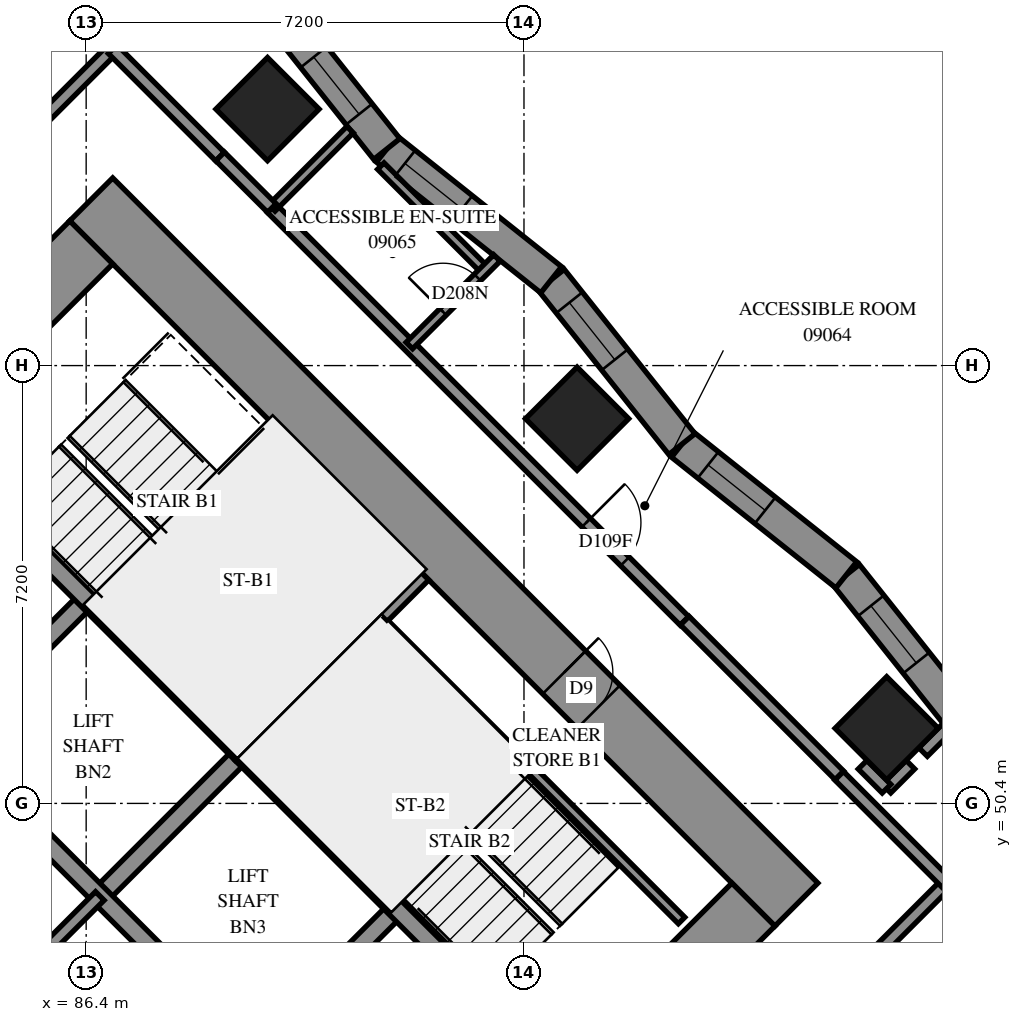
"""IFC4 building model, lengths in metres.
Left out: names, types, materials, properties, quantities, classifications, styles, units other than length and angle.
Written with IfcOpenShell. Run it as: python <this file> out.ifc"""

import sys

from ifc_helpers import new_model, si_unit, direction, frame, frame_2d, origin, origin_2d, place, context, subcontext, project, spatial, polyline, rectangle, outline, extrude, element, fill, save


model = new_model("IFC4")
c1 = context("Model", 3, precision=1e-05, world=origin(), true_north=direction((0.0, 1.0)))
c2 = subcontext(c1, "Body", "Model", "MODEL_VIEW")
j1 = project(units=[si_unit("LENGTHUNIT", "METRE"), si_unit("PLANEANGLEUNIT", "RADIAN")], contexts=[c1])
p1 = place(None, origin())
s1 = spatial("IfcSite", under=j1, at=p1, CompositionType="ELEMENT")
p2 = place(p1, origin())
s2 = spatial("IfcBuilding", under=s1, at=p2, CompositionType="ELEMENT")
p3 = place(p2, frame((0.0, 0.0, 37.2)))
s3 = spatial("IfcBuildingStorey", under=s2, at=p3, CompositionType="ELEMENT", Elevation=37.2)
for number, where, z_axis, x_axis in (
    (1, (89.382, 61.818, 0.0), (0.0, 0.0, 1.0), (0.707, -0.707, 0.0)),
    (2, (94.474, 56.727, 0.0), (0.0, 0.0, 1.0), (0.707, -0.707, 0.0)),
    (3, (99.565, 51.635, 0.0), (0.0, 0.0, 1.0), (0.707, -0.707, 0.0)),
):
    element("IfcColumn", number, at=place(p3, frame(where, z_axis=z_axis, x_axis=x_axis)), inside=s3, PredefinedType="COLUMN", context=c2, shape_type="SweptSolid", body=[
        extrude(rectangle(XDim=1.2, YDim=1.2, at=origin_2d()), origin(), (0.0, 0.0, 1.0), 3.1),
    ])
p4 = place(p3, frame((75.594, 49.443, -0.3), z_axis=(0.0, 0.0, 1.0), x_axis=(0.7071037324, -0.70710983, 0.0)))
e4 = element("IfcWall", 4, at=p4, inside=s3, PredefinedType="SHEAR", context=c2, shape_type="SweptSolid", body=[
    extrude(rectangle(XDim=16.4, YDim=1.0, at=frame_2d((8.2, 0.0))), origin(), (0.0, 0.0, 1.0), 2.7),
])
p5 = place(p3, frame((86.483, 60.333, -0.3), z_axis=(0.0, 0.0, 1.0), x_axis=(0.70710983, -0.7071037324, 0.0)))
e5 = element("IfcWall", 5, at=p5, inside=s3, PredefinedType="SHEAR", context=c2, shape_type="SweptSolid", body=[
    extrude(rectangle(XDim=16.4, YDim=1.0, at=frame_2d((8.2, 0.0))), origin(), (0.0, 0.0, 1.0), 2.7),
])
p6 = place(p5, frame((11.0, 0.0, 0.3)))
e6 = element("IfcOpeningElement", 6, at=p6, cuts=e5, PredefinedType="OPENING", context=c2, shape_type="SweptSolid", body=[
    extrude(rectangle(XDim=0.8, YDim=2.1, at=frame_2d((0.4, 1.05))), frame((0.0, 0.51, 0.0), z_axis=(0.0, -1.0, 0.0), x_axis=(1.0, 0.0, 0.0)), (0.0, 0.0, 1.0), 1.02),
])
p7 = place(p3, frame((76.301, 49.443, -0.3), z_axis=(0.0, 0.0, 1.0), x_axis=(0.7071067812, 0.7071067812, 0.0)))
e7 = element("IfcWall", 7, at=p7, inside=s3, PredefinedType="SHEAR", context=c2, shape_type="SweptSolid", body=[
    extrude(rectangle(XDim=14.4, YDim=1.0, at=frame_2d((7.2, 0.0))), origin(), (0.0, 0.0, 1.0), 2.7),
])
p8 = place(p7, frame((4.55, 0.0, 0.3)))
e8 = element("IfcOpeningElement", 8, at=p8, cuts=e7, PredefinedType="OPENING", context=c2, shape_type="SweptSolid", body=[
    extrude(rectangle(XDim=1.1, YDim=2.1, at=frame_2d((0.55, 1.05))), frame((0.0, 0.51, 0.0), z_axis=(0.0, -1.0, 0.0), x_axis=(1.0, 0.0, 0.0)), (0.0, 0.0, 1.0), 1.02),
])
p9 = place(p7, frame((11.35, 0.0, 0.3)))
e9 = element("IfcOpeningElement", 9, at=p9, cuts=e7, PredefinedType="OPENING", context=c2, shape_type="SweptSolid", body=[
    extrude(rectangle(XDim=1.1, YDim=2.1, at=frame_2d((0.55, 1.05))), frame((0.0, 0.51, 0.0), z_axis=(0.0, -1.0, 0.0), x_axis=(1.0, 0.0, 0.0)), (0.0, 0.0, 1.0), 1.02),
])
p10 = place(p3, frame((87.19, 38.554, -0.3), z_axis=(0.0, 0.0, 1.0), x_axis=(0.707103309, 0.7071102534, 0.0)))
e10 = element("IfcWall", 10, at=p10, inside=s3, PredefinedType="SHEAR", context=c2, shape_type="SweptSolid", body=[
    extrude(rectangle(XDim=14.4, YDim=1.0, at=frame_2d((7.2, 0.0))), origin(), (0.0, 0.0, 1.0), 2.7),
])
p11 = place(p10, frame((4.55, 0.0, 0.3)))
e11 = element("IfcOpeningElement", 11, at=p11, cuts=e10, PredefinedType="OPENING", context=c2, shape_type="SweptSolid", body=[
    extrude(rectangle(XDim=1.1, YDim=2.1, at=frame_2d((0.55, 1.05))), frame((0.0, 0.51, 0.0), z_axis=(0.0, -1.0, 0.0), x_axis=(1.0, 0.0, 0.0)), (0.0, 0.0, 1.0), 1.02),
])
p12 = place(p10, frame((11.35, 0.0, 0.3)))
e12 = element("IfcOpeningElement", 12, at=p12, cuts=e10, PredefinedType="OPENING", context=c2, shape_type="SweptSolid", body=[
    extrude(rectangle(XDim=1.1, YDim=2.1, at=frame_2d((0.55, 1.05))), frame((0.0, 0.51, 0.0), z_axis=(0.0, -1.0, 0.0), x_axis=(1.0, 0.0, 0.0)), (0.0, 0.0, 1.0), 1.02),
])
p13 = place(p3, frame((84.079, 51.423, 0.0), z_axis=(0.0, 0.0, 1.0), x_axis=(0.7071219326, 0.7070916295, 0.0)))
e13 = element("IfcWall", 13, at=p13, inside=s3, PredefinedType="SOLIDWALL", context=c2, shape_type="SweptSolid", body=[
    extrude(rectangle(XDim=3.3, YDim=0.3, at=frame_2d((1.65, 0.0))), origin(), (0.0, 0.0, 1.0), 3.1),
])
for number, where, z_axis, x_axis in (
    (14, (86.625, 48.878, 0.0), (0.0, 0.0, 1.0), (0.707, 0.707, 0.0)),
    (15, (89.17, 46.332, 0.0), (0.0, 0.0, 1.0), (0.707, 0.707, 0.0)),
):
    element("IfcWall", number, at=place(p3, frame(where, z_axis=z_axis, x_axis=x_axis)), inside=s3, PredefinedType="SOLIDWALL", context=c2, shape_type="SweptSolid", body=[
        extrude(rectangle(XDim=3.3, YDim=0.3, at=frame_2d((1.65, 0.0))), origin(), (0.0, 0.0, 1.0), 3.1),
    ])
p14 = place(p3, frame((78.988, 51.423, 0.0), z_axis=(0.0, 0.0, 1.0), x_axis=(0.7071067812, -0.7071067812, 0.0)))
e16 = element("IfcWall", 16, at=p14, inside=s3, PredefinedType="SOLIDWALL", context=c2, shape_type="SweptSolid", body=[
    extrude(rectangle(XDim=14.4, YDim=0.3, at=frame_2d((7.2, 0.0))), origin(), (0.0, 0.0, 1.0), 3.1),
])
p15 = place(p14, frame((1.25, 0.0, 0.0)))
e17 = element("IfcOpeningElement", 17, at=p15, cuts=e16, PredefinedType="OPENING", context=c2, shape_type="SweptSolid", body=[
    extrude(rectangle(XDim=1.1, YDim=2.1, at=frame_2d((0.55, 1.05))), frame((0.0, 0.16, 0.0), z_axis=(0.0, -1.0, 0.0), x_axis=(1.0, 0.0, 0.0)), (0.0, 0.0, 1.0), 0.32),
])
p16 = place(p14, frame((4.85, 0.0, 0.0)))
e18 = element("IfcOpeningElement", 18, at=p16, cuts=e16, PredefinedType="OPENING", context=c2, shape_type="SweptSolid", body=[
    extrude(rectangle(XDim=1.1, YDim=2.1, at=frame_2d((0.55, 1.05))), frame((0.0, 0.16, 0.0), z_axis=(0.0, -1.0, 0.0), x_axis=(1.0, 0.0, 0.0)), (0.0, 0.0, 1.0), 0.32),
])
p17 = place(p14, frame((8.45, 0.0, 0.0)))
e19 = element("IfcOpeningElement", 19, at=p17, cuts=e16, PredefinedType="OPENING", context=c2, shape_type="SweptSolid", body=[
    extrude(rectangle(XDim=1.1, YDim=2.1, at=frame_2d((0.55, 1.05))), frame((0.0, 0.16, 0.0), z_axis=(0.0, -1.0, 0.0), x_axis=(1.0, 0.0, 0.0)), (0.0, 0.0, 1.0), 0.32),
])
p18 = place(p14, frame((12.05, 0.0, 0.0)))
e20 = element("IfcOpeningElement", 20, at=p18, cuts=e16, PredefinedType="OPENING", context=c2, shape_type="SweptSolid", body=[
    extrude(rectangle(XDim=1.1, YDim=2.1, at=frame_2d((0.55, 1.05))), frame((0.0, 0.16, 0.0), z_axis=(0.0, -1.0, 0.0), x_axis=(1.0, 0.0, 0.0)), (0.0, 0.0, 1.0), 0.32),
])
p19 = place(p3, frame((81.534, 53.969, 0.0), z_axis=(0.0, 0.0, 1.0), x_axis=(0.707103309, -0.7071102534, 0.0)))
e21 = element("IfcWall", 21, at=p19, inside=s3, PredefinedType="SOLIDWALL", context=c2, shape_type="SweptSolid", body=[
    extrude(rectangle(XDim=14.4, YDim=0.3, at=frame_2d((7.2, 0.0))), origin(), (0.0, 0.0, 1.0), 3.1),
])
p20 = place(p19, frame((12.05, 0.0, 0.0)))
e22 = element("IfcOpeningElement", 22, at=p20, cuts=e21, PredefinedType="OPENING", context=c2, shape_type="SweptSolid", body=[
    extrude(rectangle(XDim=1.1, YDim=2.1, at=frame_2d((0.55, 1.05))), frame((0.0, 0.16, 0.0), z_axis=(0.0, -1.0, 0.0), x_axis=(1.0, 0.0, 0.0)), (0.0, 0.0, 1.0), 0.32),
])
for number, where, z_axis, x_axis in (
    (23, (83.867, 56.302, 0.0), (0.0, 0.0, 1.0), (0.707, -0.707, 0.0)),
    (24, (88.958, 51.211, 0.0), (0.0, 0.0, 1.0), (0.707, -0.707, 0.0)),
):
    element("IfcWall", number, at=place(p3, frame(where, z_axis=z_axis, x_axis=x_axis)), inside=s3, PredefinedType="SOLIDWALL", context=c2, shape_type="SweptSolid", body=[
        extrude(rectangle(XDim=7.2, YDim=0.3, at=frame_2d((3.6, 0.0))), origin(), (0.0, 0.0, 1.0), 3.1),
    ])
p21 = place(p3, frame((88.958, 51.211, 0.0), z_axis=(0.0, 0.0, 1.0), x_axis=(0.7071067812, 0.7071067812, 0.0)))
e25 = element("IfcWall", 25, at=p21, inside=s3, PredefinedType="SOLIDWALL", context=c2, shape_type="SweptSolid", body=[
    extrude(rectangle(XDim=4.2, YDim=0.3, at=frame_2d((2.1, 0.0))), origin(), (0.0, 0.0, 1.0), 3.1),
])
p22 = place(p3, frame((101.05, 51.455, 0.0), z_axis=(0.0, 0.0, 1.0), x_axis=(-0.6225070424, 0.7826141976, 0.0)))
e26 = element("IfcWall", 26, at=p22, inside=s3, PredefinedType="SOLIDWALL", context=c2, shape_type="SweptSolid", body=[
    extrude(outline(polyline([(0.031, -0.275), (3.485, -0.275), (3.423, 0.275), (-0.031, 0.275), (0.031, -0.275)])), origin(), (0.0, 0.0, 1.0), 3.1),
])
p23 = place(p22, frame((1.604, 0.0, 0.5)))
e27 = element("IfcOpeningElement", 27, at=p23, cuts=e26, PredefinedType="OPENING", context=c2, shape_type="SweptSolid", body=[
    extrude(rectangle(XDim=1.2, YDim=2.45, at=frame_2d((0.6, 1.225))), frame((0.0, 0.285, 0.0), z_axis=(0.0, -1.0, 0.0), x_axis=(1.0, 0.0, 0.0)), (0.0, 0.0, 1.0), 0.57),
])
p24 = place(p3, frame((98.9, 54.158, 0.0), z_axis=(0.0, 0.0, 1.0), x_axis=(-0.7826029777, 0.6225211477, 0.0)))
e28 = element("IfcWall", 28, at=p24, inside=s3, PredefinedType="SOLIDWALL", context=c2, shape_type="SweptSolid", body=[
    extrude(outline(polyline([(-0.031, -0.275), (3.423, -0.275), (3.485, 0.275), (0.031, 0.275), (-0.031, -0.275)])), origin(), (0.0, 0.0, 1.0), 3.1),
])
p25 = place(p24, frame((1.704, 0.0, 0.5)))
e29 = element("IfcOpeningElement", 29, at=p25, cuts=e28, PredefinedType="OPENING", context=c2, shape_type="SweptSolid", body=[
    extrude(rectangle(XDim=1.2, YDim=2.45, at=frame_2d((0.6, 1.225))), frame((0.0, 0.285, 0.0), z_axis=(0.0, -1.0, 0.0), x_axis=(1.0, 0.0, 0.0)), (0.0, 0.0, 1.0), 0.57),
])
p26 = place(p3, frame((96.197, 56.308, 0.0), z_axis=(0.0, 0.0, 1.0), x_axis=(-0.6225070424, 0.7826141976, 0.0)))
e30 = element("IfcWall", 30, at=p26, inside=s3, PredefinedType="SOLIDWALL", context=c2, shape_type="SweptSolid", body=[
    extrude(outline(polyline([(0.031, -0.275), (3.485, -0.275), (3.423, 0.275), (-0.031, 0.275), (0.031, -0.275)])), origin(), (0.0, 0.0, 1.0), 3.1),
])
p27 = place(p26, frame((1.773, 0.0, 0.5)))
e31 = element("IfcOpeningElement", 31, at=p27, cuts=e30, PredefinedType="OPENING", context=c2, shape_type="SweptSolid", body=[
    extrude(rectangle(XDim=1.2, YDim=2.45, at=frame_2d((0.6, 1.225))), frame((0.0, 0.285, 0.0), z_axis=(0.0, -1.0, 0.0), x_axis=(1.0, 0.0, 0.0)), (0.0, 0.0, 1.0), 0.57),
])
p28 = place(p3, frame((94.047, 59.011, 0.0), z_axis=(0.0, 0.0, 1.0), x_axis=(-0.7826141976, 0.6225070424, 0.0)))
e32 = element("IfcWall", 32, at=p28, inside=s3, PredefinedType="SOLIDWALL", context=c2, shape_type="SweptSolid", body=[
    extrude(outline(polyline([(-0.031, -0.275), (3.423, -0.275), (3.485, 0.275), (0.031, 0.275), (-0.031, -0.275)])), origin(), (0.0, 0.0, 1.0), 3.1),
])
p29 = place(p28, frame((1.874, 0.0, 0.5)))
e33 = element("IfcOpeningElement", 33, at=p29, cuts=e32, PredefinedType="OPENING", context=c2, shape_type="SweptSolid", body=[
    extrude(rectangle(XDim=1.2, YDim=2.45, at=frame_2d((0.6, 1.225))), frame((0.0, 0.285, 0.0), z_axis=(0.0, -1.0, 0.0), x_axis=(1.0, 0.0, 0.0)), (0.0, 0.0, 1.0), 0.57),
])
p30 = place(p3, frame((91.344, 61.162, 0.0), z_axis=(0.0, 0.0, 1.0), x_axis=(-0.6225070424, 0.7826141976, 0.0)))
e34 = element("IfcWall", 34, at=p30, inside=s3, PredefinedType="SOLIDWALL", context=c2, shape_type="SweptSolid", body=[
    extrude(outline(polyline([(0.031, -0.275), (3.485, -0.275), (3.423, 0.275), (-0.031, 0.275), (0.031, -0.275)])), origin(), (0.0, 0.0, 1.0), 3.1),
])
p31 = place(p30, frame((0.732, 0.0, 0.5)))
e35 = element("IfcOpeningElement", 35, at=p31, cuts=e34, PredefinedType="OPENING", context=c2, shape_type="SweptSolid", body=[
    extrude(rectangle(XDim=1.2, YDim=2.45, at=frame_2d((0.6, 1.225))), frame((0.0, 0.285, 0.0), z_axis=(0.0, -1.0, 0.0), x_axis=(1.0, 0.0, 0.0)), (0.0, 0.0, 1.0), 0.57),
])
p32 = place(p3, frame((91.313, 53.354, 0.0), z_axis=(0.0, 0.0, 1.0), x_axis=(0.7071140275, -0.7070995348, 0.0)))
e36 = element("IfcWall", 36, at=p32, inside=s3, PredefinedType="PARTITIONING", context=c2, shape_type="SweptSolid", body=[
    extrude(rectangle(XDim=6.9, YDim=0.15, at=frame_2d((3.45, 0.0))), origin(), (0.0, 0.0, 1.0), 3.1),
])
p33 = place(p3, frame((84.079, 46.332, 0.0), z_axis=(0.0, 0.0, 1.0), x_axis=(0.7071067812, 0.7071067812, 0.0)))
e37 = element("IfcWall", 37, at=p33, inside=s3, PredefinedType="PARTITIONING", context=c2, shape_type="SweptSolid", body=[
    extrude(rectangle(XDim=3.6, YDim=0.2, at=frame_2d((1.8, 0.0))), origin(), (0.0, 0.0, 1.0), 3.1),
])
p34 = place(p3, frame((94.367, 41.349, 0.0), z_axis=(0.0, 0.0, 1.0), x_axis=(0.7071109931, 0.7071025693, 0.0)))
e38 = element("IfcWall", 38, at=p34, inside=s3, PredefinedType="PARTITIONING", context=c2, shape_type="SweptSolid", body=[
    extrude(rectangle(XDim=11.871, YDim=0.2, at=frame_2d((5.936, 0.0))), origin(), (0.0, 0.0, 1.0), 3.1),
])
p35 = place(p3, frame((79.871, 55.843, 0.0), z_axis=(0.0, 0.0, 1.0), x_axis=(0.7071067812, 0.7071067812, 0.0)))
e39 = element("IfcWall", 39, at=p35, inside=s3, PredefinedType="PARTITIONING", context=c2, shape_type="SweptSolid", body=[
    extrude(rectangle(XDim=9.85, YDim=0.2, at=frame_2d((4.925, 0.0))), origin(), (0.0, 0.0, 1.0), 3.1),
])
p36 = place(p35, frame((1.135, 0.0, 0.0)))
e40 = element("IfcOpeningElement", 40, at=p36, cuts=e39, PredefinedType="OPENING", context=c2, shape_type="SweptSolid", body=[
    extrude(rectangle(XDim=1.0, YDim=2.1, at=frame_2d((0.5, 1.05))), frame((0.0, 0.11, 0.0), z_axis=(0.0, -1.0, 0.0), x_axis=(1.0, 0.0, 0.0)), (0.0, 0.0, 1.0), 0.22),
])
p37 = place(p3, frame((93.59, 42.126, 0.0), z_axis=(0.0, 0.0, 1.0), x_axis=(0.7071067812, 0.7071067812, 0.0)))
e41 = element("IfcWall", 41, at=p37, inside=s3, PredefinedType="PARTITIONING", context=c2, shape_type="SweptSolid", body=[
    extrude(rectangle(XDim=9.849, YDim=0.2, at=frame_2d((4.924, 0.0))), origin(), (0.0, 0.0, 1.0), 3.1),
])
p38 = place(p37, frame((0.148, 0.0, 0.0)))
e42 = element("IfcOpeningElement", 42, at=p38, cuts=e41, PredefinedType="OPENING", context=c2, shape_type="SweptSolid", body=[
    extrude(rectangle(XDim=1.0, YDim=2.1, at=frame_2d((0.5, 1.05))), frame((0.0, 0.11, 0.0), z_axis=(0.0, -1.0, 0.0), x_axis=(1.0, 0.0, 0.0)), (0.0, 0.0, 1.0), 0.22),
])
p39 = place(p3, frame((89.451, 60.189, 0.0), z_axis=(0.0, 0.0, 1.0), x_axis=(0.7071796965, -0.7070338583, 0.0)))
e43 = element("IfcWall", 43, at=p39, inside=s3, PredefinedType="PARTITIONING", context=c2, shape_type="SweptSolid", body=[
    extrude(rectangle(XDim=9.6, YDim=0.2, at=frame_2d((4.8, 0.0))), origin(), (0.0, 0.0, 1.0), 3.1),
])
p40 = place(p39, frame((7.315, 0.0, 0.0)))
e44 = element("IfcOpeningElement", 44, at=p40, cuts=e43, PredefinedType="OPENING", context=c2, shape_type="SweptSolid", body=[
    extrude(rectangle(XDim=0.9, YDim=2.1, at=frame_2d((0.45, 1.05))), frame((0.0, 0.11, 0.0), z_axis=(0.0, -1.0, 0.0), x_axis=(1.0, 0.0, 0.0)), (0.0, 0.0, 1.0), 0.22),
])
p41 = place(p3, frame((96.244, 53.406, 0.0), z_axis=(0.0, 0.0, 1.0), x_axis=(0.7068288851, -0.7073845681, 0.0)))
e45 = element("IfcWall", 45, at=p41, inside=s3, PredefinedType="PARTITIONING", context=c2, shape_type="SweptSolid", body=[
    extrude(rectangle(XDim=3.599, YDim=0.2, at=frame_2d((1.8, 0.0))), origin(), (0.0, 0.0, 1.0), 3.1),
])
p42 = place(p3, frame((98.783, 50.855, 0.0), z_axis=(0.0, 0.0, 1.0), x_axis=(0.7071067812, -0.7071067812, 0.0)))
e46 = element("IfcWall", 46, at=p42, inside=s3, PredefinedType="PARTITIONING", context=c2, shape_type="SweptSolid", body=[
    extrude(rectangle(XDim=2.5, YDim=0.2, at=frame_2d((1.25, 0.0))), origin(), (0.0, 0.0, 1.0), 3.1),
])
p43 = place(p3, frame((86.835, 62.803, 0.0), z_axis=(0.0, 0.0, 1.0), x_axis=(0.7071067812, -0.7071067812, 0.0)))
e47 = element("IfcWall", 47, at=p43, inside=s3, PredefinedType="PARTITIONING", context=c2, shape_type="SweptSolid", body=[
    extrude(rectangle(XDim=2.498, YDim=0.2, at=frame_2d((1.249, 0.0))), origin(), (0.0, 0.0, 1.0), 3.1),
])
p44 = place(p3, frame((91.246, 60.881, 0.0), z_axis=(0.0, 0.0, 1.0), x_axis=(0.7071274366, -0.7070861252, 0.0)))
e48 = element("IfcWall", 48, at=p44, inside=s3, PredefinedType="PARTITIONING", context=c2, shape_type="SweptSolid", body=[
    extrude(rectangle(XDim=2.421, YDim=0.15, at=frame_2d((1.21, 0.0))), origin(), (0.0, 0.0, 1.0), 3.1),
])
p45 = place(p3, frame((91.715, 57.929, 0.0), z_axis=(0.0, 0.0, 1.0), x_axis=(0.7071067812, 0.7071067812, 0.0)))
e49 = element("IfcWall", 49, at=p45, inside=s3, PredefinedType="PARTITIONING", context=c2, shape_type="SweptSolid", body=[
    extrude(rectangle(XDim=2.037, YDim=0.15, at=frame_2d((1.018, 0.0))), origin(), (0.0, 0.0, 1.0), 3.1),
])
p46 = place(p45, frame((0.784, 0.0, 0.0)))
e50 = element("IfcOpeningElement", 50, at=p46, cuts=e49, PredefinedType="OPENING", context=c2, shape_type="SweptSolid", body=[
    extrude(rectangle(XDim=0.8, YDim=2.1, at=frame_2d((0.4, 1.05))), frame((0.0, 0.085, 0.0), z_axis=(0.0, -1.0, 0.0), x_axis=(1.0, 0.0, 0.0)), (0.0, 0.0, 1.0), 0.17),
])
p47 = place(p3, frame((89.453, 60.193, 0.0), z_axis=(0.0, 0.0, 1.0), x_axis=(0.7071342593, 0.7070793021, 0.0)))
e51 = element("IfcWall", 51, at=p47, inside=s3, PredefinedType="PARTITIONING", context=c2, shape_type="SweptSolid", body=[
    extrude(rectangle(XDim=1.82, YDim=0.15, at=frame_2d((0.91, 0.0))), origin(), (0.0, 0.0, 1.0), 3.1),
])
p48 = place(p3, frame((88.603, 61.039, 0.0), z_axis=(0.0, 0.0, 1.0), x_axis=(0.7079391603, -0.7062734211, 0.0)))
e52 = element("IfcWall", 52, at=p48, inside=s3, PredefinedType="PARTITIONING", context=c2, shape_type="SweptSolid", body=[
    extrude(rectangle(XDim=1.201, YDim=0.2, at=frame_2d((0.6, 0.0))), origin(), (0.0, 0.0, 1.0), 3.1),
])
for number, where, z_axis, x_axis in (
    (53, (99.561, 50.643, 0.0), (0.0, 0.0, 1.0), (0.707, 0.707, 0.0)),
    (54, (99.168, 51.036, 0.0), (0.0, 0.0, 1.0), (0.707, -0.707, 0.0)),
):
    element("IfcWall", number, at=place(p3, frame(where, z_axis=z_axis, x_axis=x_axis)), inside=s3, PredefinedType="PARTITIONING", context=c2, shape_type="SweptSolid", body=[
        extrude(rectangle(XDim=0.557, YDim=0.2, at=frame_2d((0.279, 0.0))), origin(), (0.0, 0.0, 1.0), 3.1),
    ])
p49 = place(p3, frame((100.163, 51.245, 0.0), z_axis=(0.0, 0.0, 1.0), x_axis=(0.7071067812, 0.7071067812, 0.0)))
e55 = element("IfcWall", 55, at=p49, inside=s3, PredefinedType="PARTITIONING", context=c2, shape_type="SweptSolid", body=[
    extrude(rectangle(XDim=0.554, YDim=0.2, at=frame_2d((0.277, 0.0))), origin(), (0.0, 0.0, 1.0), 3.1),
])
p50 = place(p23, origin())
e56 = element("IfcWindow", 56, at=p50, inside=s3, PartitioningType="SINGLE_PANEL", PredefinedType="WINDOW", context=c2, shape_type="SweptSolid", body=[
    extrude(rectangle(XDim=1.2, YDim=2.45, at=frame_2d((0.6, 1.225))), frame((0.0, 0.155, 0.0), z_axis=(0.0, -1.0, 0.0), x_axis=(1.0, 0.0, 0.0)), (0.0, 0.0, 1.0), 0.06),
])
fill(e27, e56)
p51 = place(p25, origin())
e57 = element("IfcWindow", 57, at=p51, inside=s3, PartitioningType="SINGLE_PANEL", PredefinedType="WINDOW", context=c2, shape_type="SweptSolid", body=[
    extrude(rectangle(XDim=1.2, YDim=2.45, at=frame_2d((0.6, 1.225))), frame((0.0, 0.155, 0.0), z_axis=(0.0, -1.0, 0.0), x_axis=(1.0, 0.0, 0.0)), (0.0, 0.0, 1.0), 0.06),
])
fill(e29, e57)
p52 = place(p27, origin())
e58 = element("IfcWindow", 58, at=p52, inside=s3, PartitioningType="SINGLE_PANEL", PredefinedType="WINDOW", context=c2, shape_type="SweptSolid", body=[
    extrude(rectangle(XDim=1.2, YDim=2.45, at=frame_2d((0.6, 1.225))), frame((0.0, 0.155, 0.0), z_axis=(0.0, -1.0, 0.0), x_axis=(1.0, 0.0, 0.0)), (0.0, 0.0, 1.0), 0.06),
])
fill(e31, e58)
p53 = place(p29, origin())
e59 = element("IfcWindow", 59, at=p53, inside=s3, PartitioningType="SINGLE_PANEL", PredefinedType="WINDOW", context=c2, shape_type="SweptSolid", body=[
    extrude(rectangle(XDim=1.2, YDim=2.45, at=frame_2d((0.6, 1.225))), frame((0.0, 0.155, 0.0), z_axis=(0.0, -1.0, 0.0), x_axis=(1.0, 0.0, 0.0)), (0.0, 0.0, 1.0), 0.06),
])
fill(e33, e59)
p54 = place(p31, origin())
e60 = element("IfcWindow", 60, at=p54, inside=s3, PartitioningType="SINGLE_PANEL", PredefinedType="WINDOW", context=c2, shape_type="SweptSolid", body=[
    extrude(rectangle(XDim=1.2, YDim=2.45, at=frame_2d((0.6, 1.225))), frame((0.0, 0.155, 0.0), z_axis=(0.0, -1.0, 0.0), x_axis=(1.0, 0.0, 0.0)), (0.0, 0.0, 1.0), 0.06),
])
fill(e35, e60)
p55 = place(p6, origin())
e61 = element("IfcDoor", 61, at=p55, inside=s3, OperationType="SINGLE_SWING_RIGHT", PredefinedType="DOOR", context=c2, shape_type="SweptSolid", body=[
    extrude(rectangle(XDim=0.8, YDim=2.1, at=frame_2d((0.4, 1.05))), frame((0.0, -0.44, 0.0), z_axis=(0.0, -1.0, 0.0), x_axis=(1.0, 0.0, 0.0)), (0.0, 0.0, 1.0), 0.05),
])
fill(e6, e61)
p56 = place(p40, origin())
e62 = element("IfcDoor", 62, at=p56, inside=s3, OperationType="SINGLE_SWING_LEFT", PredefinedType="DOOR", context=c2, shape_type="SweptSolid", body=[
    extrude(rectangle(XDim=0.9, YDim=2.1, at=frame_2d((0.45, 1.05))), frame((0.0, 0.025, 0.0), z_axis=(0.0, -1.0, 0.0), x_axis=(1.0, 0.0, 0.0)), (0.0, 0.0, 1.0), 0.05),
])
fill(e44, e62)
p57 = place(p46, origin())
e63 = element("IfcDoor", 63, at=p57, inside=s3, OperationType="SINGLE_SWING_RIGHT", PredefinedType="DOOR", context=c2, shape_type="SweptSolid", body=[
    extrude(rectangle(XDim=0.8, YDim=2.1, at=frame_2d((0.4, 1.05))), frame((0.0, 0.025, 0.0), z_axis=(0.0, -1.0, 0.0), x_axis=(1.0, 0.0, 0.0)), (0.0, 0.0, 1.0), 0.05),
])
fill(e50, e63)
save(model, sys.argv[1])
